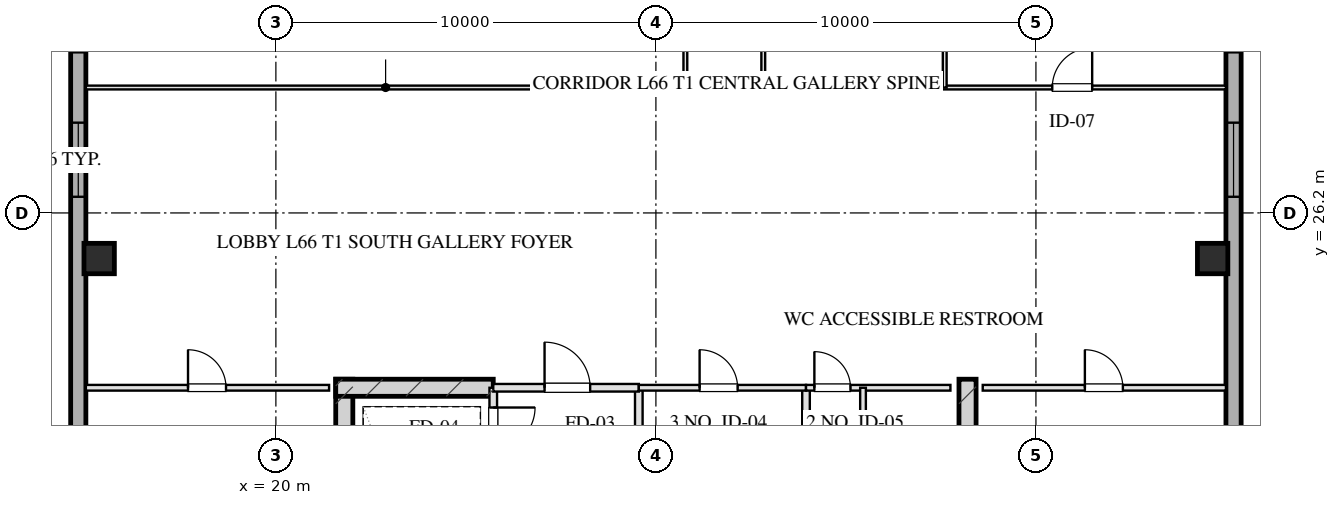
"""IFC4 building model, lengths in metres.
Left out: names, types, materials, properties, quantities, classifications, styles, units other than length and angle.
Written with IfcOpenShell. Run it as: python <this file> out.ifc"""

import sys

from ifc_helpers import new_model, si_unit, direction, frame, frame_2d, origin, origin_2d, place, context, subcontext, project, spatial, rectangle, hollow_rectangle, extrude, element, fill, save


model = new_model("IFC4")
c1 = context("Model", 3, precision=1e-05, world=origin(), true_north=direction((0.0, 1.0)))
c2 = subcontext(c1, "Body", "Model", "MODEL_VIEW")
j1 = project(units=[si_unit("LENGTHUNIT", "METRE"), si_unit("PLANEANGLEUNIT", "RADIAN")], contexts=[c1])
p1 = place(None, origin())
s1 = spatial("IfcSite", under=j1, at=p1, CompositionType="ELEMENT")
p2 = place(p1, origin())
s2 = spatial("IfcBuilding", under=s1, at=p2, CompositionType="ELEMENT")
p3 = place(p2, frame((0.0, 0.0, 244.0)))
s3 = spatial("IfcBuildingStorey", under=s2, at=p3, CompositionType="ELEMENT", Elevation=244.0)
for number, where, z_axis, x_axis in (
    (1, (21.8, 21.825, 0.0), (0.0, 0.0, 1.0), (0.0, -1.0, 0.0)),
    (2, (38.2, 21.825, 0.0), (0.0, 0.0, 1.0), (0.0, -1.0, 0.0)),
):
    element("IfcWall", number, at=place(p3, frame(where, z_axis=z_axis, x_axis=x_axis)), inside=s3, PredefinedType="SHEAR", context=c2, shape_type="SweptSolid", body=[
        extrude(rectangle(XDim=9.33, YDim=0.45, at=frame_2d((4.665, 0.0))), origin(), (0.0, 0.0, 1.0), 3.2),
    ])
p4 = place(p3, frame((21.575, 21.6, 0.0), z_axis=(0.0, 0.0, 1.0), x_axis=(1.0, 0.0, 0.0)))
e3 = element("IfcWall", 3, at=p4, inside=s3, PredefinedType="SHEAR", context=c2, shape_type="SweptSolid", body=[
    extrude(rectangle(XDim=4.145, YDim=0.45, at=frame_2d((2.073, 0.0))), origin(), (0.0, 0.0, 1.0), 3.2),
])
for number, where, z_axis, x_axis in (
    (4, (15.35, 25.0, 0.0), (0.0, 0.0, 1.0), (1.0, 0.0, 0.0)),
    (5, (44.65, 25.0, 0.0), (0.0, 0.0, 1.0), (1.0, 0.0, 0.0)),
):
    element("IfcColumn", number, at=place(p3, frame(where, z_axis=z_axis, x_axis=x_axis)), inside=s3, PredefinedType="COLUMN", context=c2, shape_type="SweptSolid", body=[
        extrude(hollow_rectangle(XDim=0.8, YDim=0.8, WallThickness=0.028, at=origin_2d()), origin(), (0.0, 0.0, 1.0), 3.201),
    ])
p5 = place(p3, frame((14.8, 13.1, 0.0), z_axis=(0.0, 0.0, 1.0), x_axis=(0.0, 1.0, 0.0)))
e6 = element("IfcWall", 6, at=p5, inside=s3, PredefinedType="SOLIDWALL", context=c2, shape_type="SweptSolid", body=[
    extrude(rectangle(XDim=41.8, YDim=0.4, at=frame_2d((20.9, 0.0))), origin(), (0.0, 0.0, 1.0), 2.36),
])
p6 = place(p5, frame((13.525, 0.0, 0.75)))
e7 = element("IfcOpeningElement", 7, at=p6, cuts=e6, PredefinedType="OPENING", context=c2, shape_type="SweptSolid", body=[
    extrude(rectangle(XDim=1.95, YDim=1.21, at=frame_2d((0.975, 0.605))), frame((0.0, 0.21, 0.0), z_axis=(0.0, -1.0, 0.0), x_axis=(1.0, 0.0, 0.0)), (0.0, 0.0, 1.0), 0.42),
])
p7 = place(p5, frame((17.325, 0.0, 0.75)))
e8 = element("IfcOpeningElement", 8, at=p7, cuts=e6, PredefinedType="OPENING", context=c2, shape_type="SweptSolid", body=[
    extrude(rectangle(XDim=1.95, YDim=1.21, at=frame_2d((0.975, 0.605))), frame((0.0, 0.21, 0.0), z_axis=(0.0, -1.0, 0.0), x_axis=(1.0, 0.0, 0.0)), (0.0, 0.0, 1.0), 0.42),
])
p8 = place(p5, frame((22.525, 0.0, 0.75)))
e9 = element("IfcOpeningElement", 9, at=p8, cuts=e6, PredefinedType="OPENING", context=c2, shape_type="SweptSolid", body=[
    extrude(rectangle(XDim=1.95, YDim=1.21, at=frame_2d((0.975, 0.605))), frame((0.0, 0.21, 0.0), z_axis=(0.0, -1.0, 0.0), x_axis=(1.0, 0.0, 0.0)), (0.0, 0.0, 1.0), 0.42),
])
p9 = place(p5, frame((26.325, 0.0, 0.75)))
e10 = element("IfcOpeningElement", 10, at=p9, cuts=e6, PredefinedType="OPENING", context=c2, shape_type="SweptSolid", body=[
    extrude(rectangle(XDim=1.95, YDim=1.21, at=frame_2d((0.975, 0.605))), frame((0.0, 0.21, 0.0), z_axis=(0.0, -1.0, 0.0), x_axis=(1.0, 0.0, 0.0)), (0.0, 0.0, 1.0), 0.42),
])
p10 = place(p3, frame((45.2, 54.9, 0.0), z_axis=(0.0, 0.0, 1.0), x_axis=(0.0, -1.0, 0.0)))
e11 = element("IfcWall", 11, at=p10, inside=s3, PredefinedType="SOLIDWALL", context=c2, shape_type="SweptSolid", body=[
    extrude(rectangle(XDim=41.8, YDim=0.4, at=frame_2d((20.9, 0.0))), origin(), (0.0, 0.0, 1.0), 2.36),
])
p11 = place(p10, frame((26.325, 0.0, 0.75)))
e12 = element("IfcOpeningElement", 12, at=p11, cuts=e11, PredefinedType="OPENING", context=c2, shape_type="SweptSolid", body=[
    extrude(rectangle(XDim=1.95, YDim=1.21, at=frame_2d((0.975, 0.605))), frame((0.0, 0.21, 0.0), z_axis=(0.0, -1.0, 0.0), x_axis=(1.0, 0.0, 0.0)), (0.0, 0.0, 1.0), 0.42),
])
p12 = place(p10, frame((22.525, 0.0, 0.75)))
e13 = element("IfcOpeningElement", 13, at=p12, cuts=e11, PredefinedType="OPENING", context=c2, shape_type="SweptSolid", body=[
    extrude(rectangle(XDim=1.95, YDim=1.21, at=frame_2d((0.975, 0.605))), frame((0.0, 0.21, 0.0), z_axis=(0.0, -1.0, 0.0), x_axis=(1.0, 0.0, 0.0)), (0.0, 0.0, 1.0), 0.42),
])
p13 = place(p10, frame((17.325, 0.0, 0.75)))
e14 = element("IfcOpeningElement", 14, at=p13, cuts=e11, PredefinedType="OPENING", context=c2, shape_type="SweptSolid", body=[
    extrude(rectangle(XDim=1.95, YDim=1.21, at=frame_2d((0.975, 0.605))), frame((0.0, 0.21, 0.0), z_axis=(0.0, -1.0, 0.0), x_axis=(1.0, 0.0, 0.0)), (0.0, 0.0, 1.0), 0.42),
])
p14 = place(p10, frame((13.525, 0.0, 0.75)))
e15 = element("IfcOpeningElement", 15, at=p14, cuts=e11, PredefinedType="OPENING", context=c2, shape_type="SweptSolid", body=[
    extrude(rectangle(XDim=1.95, YDim=1.21, at=frame_2d((0.975, 0.605))), frame((0.0, 0.21, 0.0), z_axis=(0.0, -1.0, 0.0), x_axis=(1.0, 0.0, 0.0)), (0.0, 0.0, 1.0), 0.42),
])
p15 = place(p3, frame((25.72, 21.6, 0.0), z_axis=(0.0, 0.0, 1.0), x_axis=(0.0, -1.0, 0.0)))
e16 = element("IfcWall", 16, at=p15, inside=s3, PredefinedType="PARTITIONING", context=c2, shape_type="SweptSolid", body=[
    extrude(rectangle(XDim=1.9, YDim=0.2, at=frame_2d((0.95, 0.0))), origin(), (0.0, 0.0, 1.0), 2.925),
])
p16 = place(p15, frame((0.52, 0.0, 0.0)))
e17 = element("IfcOpeningElement", 17, at=p16, cuts=e16, PredefinedType="OPENING", context=c2, shape_type="SweptSolid", body=[
    extrude(rectangle(XDim=1.1, YDim=2.05, at=frame_2d((0.55, 1.025))), frame((0.0, 0.11, 0.0), z_axis=(0.0, -1.0, 0.0), x_axis=(1.0, 0.0, 0.0)), (0.0, 0.0, 1.0), 0.22),
])
p17 = place(p3, frame((29.55, 21.6, 0.0), z_axis=(0.0, 0.0, 1.0), x_axis=(0.0, -1.0, 0.0)))
e18 = element("IfcWall", 18, at=p17, inside=s3, PredefinedType="PARTITIONING", context=c2, shape_type="SweptSolid", body=[
    extrude(rectangle(XDim=8.43, YDim=0.2, at=frame_2d((4.215, 0.0))), origin(), (0.0, 0.0, 1.0), 2.925),
])
p18 = place(p3, frame((25.72, 21.6, 0.0), z_axis=(0.0, 0.0, 1.0), x_axis=(1.0, 0.0, 0.0)))
e19 = element("IfcWall", 19, at=p18, inside=s3, PredefinedType="PARTITIONING", context=c2, shape_type="SweptSolid", body=[
    extrude(rectangle(XDim=3.83, YDim=0.2, at=frame_2d((1.915, 0.0))), origin(), (0.0, 0.0, 1.0), 2.925),
])
p19 = place(p18, frame((1.35, 0.0, 0.0)))
e20 = element("IfcOpeningElement", 20, at=p19, cuts=e19, PredefinedType="OPENING", context=c2, shape_type="SweptSolid", body=[
    extrude(rectangle(XDim=1.2, YDim=2.05, at=frame_2d((0.6, 1.025))), frame((0.0, 0.11, 0.0), z_axis=(0.0, -1.0, 0.0), x_axis=(1.0, 0.0, 0.0)), (0.0, 0.0, 1.0), 0.22),
])
p20 = place(p3, frame((33.95, 21.6, 0.0), z_axis=(0.0, 0.0, 1.0), x_axis=(0.0, -1.0, 0.0)))
e21 = element("IfcWall", 21, at=p20, inside=s3, PredefinedType="PARTITIONING", context=c2, shape_type="SweptSolid", body=[
    extrude(rectangle(XDim=8.43, YDim=0.2, at=frame_2d((4.215, 0.0))), origin(), (0.0, 0.0, 1.0), 2.925),
])
p21 = place(p3, frame((29.55, 21.6, 0.0), z_axis=(0.0, 0.0, 1.0), x_axis=(1.0, 0.0, 0.0)))
e22 = element("IfcWall", 22, at=p21, inside=s3, PredefinedType="PARTITIONING", context=c2, shape_type="SweptSolid", body=[
    extrude(rectangle(XDim=4.4, YDim=0.15, at=frame_2d((2.2, 0.0))), origin(), (0.0, 0.0, 1.0), 2.925),
])
p22 = place(p21, frame((1.6, 0.0, 0.0)))
e23 = element("IfcOpeningElement", 23, at=p22, cuts=e22, PredefinedType="OPENING", context=c2, shape_type="SweptSolid", body=[
    extrude(rectangle(XDim=1.0, YDim=2.05, at=frame_2d((0.5, 1.025))), frame((0.0, 0.085, 0.0), z_axis=(0.0, -1.0, 0.0), x_axis=(1.0, 0.0, 0.0)), (0.0, 0.0, 1.0), 0.17),
])
p23 = place(p3, frame((33.95, 21.6, 0.0), z_axis=(0.0, 0.0, 1.0), x_axis=(1.0, 0.0, 0.0)))
e24 = element("IfcWall", 24, at=p23, inside=s3, PredefinedType="PARTITIONING", context=c2, shape_type="SweptSolid", body=[
    extrude(rectangle(XDim=3.8, YDim=0.15, at=frame_2d((1.9, 0.0))), origin(), (0.0, 0.0, 1.0), 2.925),
])
p24 = place(p23, frame((0.22, 0.0, 0.0)))
e25 = element("IfcOpeningElement", 25, at=p24, cuts=e24, PredefinedType="OPENING", context=c2, shape_type="SweptSolid", body=[
    extrude(rectangle(XDim=0.95, YDim=2.05, at=frame_2d((0.475, 1.025))), frame((0.0, 0.085, 0.0), z_axis=(0.0, -1.0, 0.0), x_axis=(1.0, 0.0, 0.0)), (0.0, 0.0, 1.0), 0.17),
])
p25 = place(p3, frame((35.45, 21.6, 0.0), z_axis=(0.0, 0.0, 1.0), x_axis=(0.0, -1.0, 0.0)))
e26 = element("IfcWall", 26, at=p25, inside=s3, PredefinedType="PARTITIONING", context=c2, shape_type="SweptSolid", body=[
    extrude(rectangle(XDim=8.43, YDim=0.15, at=frame_2d((4.215, 0.0))), origin(), (0.0, 0.0, 1.0), 2.515),
])
p26 = place(p25, frame((2.55, 0.0, 0.0)))
e27 = element("IfcOpeningElement", 27, at=p26, cuts=e26, PredefinedType="OPENING", context=c2, shape_type="SweptSolid", body=[
    extrude(rectangle(XDim=0.95, YDim=2.05, at=frame_2d((0.475, 1.025))), frame((0.0, 0.085, 0.0), z_axis=(0.0, -1.0, 0.0), x_axis=(1.0, 0.0, 0.0)), (0.0, 0.0, 1.0), 0.17),
])
p27 = place(p25, frame((5.8, 0.0, 0.0)))
e28 = element("IfcOpeningElement", 28, at=p27, cuts=e26, PredefinedType="OPENING", context=c2, shape_type="SweptSolid", body=[
    extrude(rectangle(XDim=0.9, YDim=2.05, at=frame_2d((0.45, 1.025))), frame((0.0, 0.085, 0.0), z_axis=(0.0, -1.0, 0.0), x_axis=(1.0, 0.0, 0.0)), (0.0, 0.0, 1.0), 0.17),
])
p28 = place(p3, frame((15.0, 21.6, 0.0), z_axis=(0.0, 0.0, 1.0), x_axis=(1.0, 0.0, 0.0)))
e29 = element("IfcWall", 29, at=p28, inside=s3, PredefinedType="PARTITIONING", context=c2, shape_type="SweptSolid", body=[
    extrude(rectangle(XDim=6.4, YDim=0.15, at=frame_2d((3.2, 0.0))), origin(), (0.0, 0.0, 1.0), 2.925),
])
p29 = place(p28, frame((2.688, 0.0, 0.0)))
e30 = element("IfcOpeningElement", 30, at=p29, cuts=e29, PredefinedType="OPENING", context=c2, shape_type="SweptSolid", body=[
    extrude(rectangle(XDim=1.0, YDim=2.05, at=frame_2d((0.5, 1.025))), frame((0.0, 0.085, 0.0), z_axis=(0.0, -1.0, 0.0), x_axis=(1.0, 0.0, 0.0)), (0.0, 0.0, 1.0), 0.17),
])
p30 = place(p3, frame((38.6, 21.6, 0.0), z_axis=(0.0, 0.0, 1.0), x_axis=(1.0, 0.0, 0.0)))
e31 = element("IfcWall", 31, at=p30, inside=s3, PredefinedType="PARTITIONING", context=c2, shape_type="SweptSolid", body=[
    extrude(rectangle(XDim=6.4, YDim=0.15, at=frame_2d((3.2, 0.0))), origin(), (0.0, 0.0, 1.0), 2.925),
])
p31 = place(p30, frame((2.688, 0.0, 0.0)))
e32 = element("IfcOpeningElement", 32, at=p31, cuts=e31, PredefinedType="OPENING", context=c2, shape_type="SweptSolid", body=[
    extrude(rectangle(XDim=1.0, YDim=2.05, at=frame_2d((0.5, 1.025))), frame((0.0, 0.085, 0.0), z_axis=(0.0, -1.0, 0.0), x_axis=(1.0, 0.0, 0.0)), (0.0, 0.0, 1.0), 0.17),
])
p32 = place(p3, frame((15.0, 29.5, 0.0), z_axis=(0.0, 0.0, 1.0), x_axis=(1.0, 0.0, 0.0)))
e33 = element("IfcWall", 33, at=p32, inside=s3, PredefinedType="MOVABLE", context=c2, shape_type="SweptSolid", body=[
    extrude(rectangle(XDim=15.775, YDim=0.1, at=frame_2d((7.887, 0.0))), origin(), (0.0, 0.0, 1.0), 2.925),
])
p33 = place(p3, frame((32.825, 29.5, 0.0), z_axis=(0.0, 0.0, 1.0), x_axis=(1.0, 0.0, 0.0)))
e34 = element("IfcWall", 34, at=p33, inside=s3, PredefinedType="MOVABLE", context=c2, shape_type="SweptSolid", body=[
    extrude(rectangle(XDim=12.175, YDim=0.1, at=frame_2d((6.087, 0.0))), origin(), (0.0, 0.0, 1.0), 2.925),
])
p34 = place(p33, frame((7.605, 0.0, 0.0)))
e35 = element("IfcOpeningElement", 35, at=p34, cuts=e34, PredefinedType="OPENING", context=c2, shape_type="SweptSolid", body=[
    extrude(rectangle(XDim=1.05, YDim=2.05, at=frame_2d((0.525, 1.025))), frame((0.0, 0.06, 0.0), z_axis=(0.0, -1.0, 0.0), x_axis=(1.0, 0.0, 0.0)), (0.0, 0.0, 1.0), 0.12),
])
p35 = place(p3, frame((30.775, 29.5, 0.0), z_axis=(0.0, 0.0, 1.0), x_axis=(0.0, 1.0, 0.0)))
e36 = element("IfcWall", 36, at=p35, inside=s3, PredefinedType="MOVABLE", context=c2, shape_type="SweptSolid", body=[
    extrude(rectangle(XDim=9.0, YDim=0.1, at=frame_2d((4.5, 0.0))), origin(), (0.0, 0.0, 1.0), 2.925),
])
p36 = place(p35, frame((1.2, 0.0, 0.0)))
e37 = element("IfcOpeningElement", 37, at=p36, cuts=e36, PredefinedType="OPENING", context=c2, shape_type="SweptSolid", body=[
    extrude(rectangle(XDim=1.0, YDim=2.05, at=frame_2d((0.5, 1.025))), frame((0.0, 0.06, 0.0), z_axis=(0.0, -1.0, 0.0), x_axis=(1.0, 0.0, 0.0)), (0.0, 0.0, 1.0), 0.12),
])
p37 = place(p35, frame((4.035, 0.0, 0.0)))
e38 = element("IfcOpeningElement", 38, at=p37, cuts=e36, PredefinedType="OPENING", context=c2, shape_type="SweptSolid", body=[
    extrude(rectangle(XDim=1.0, YDim=2.05, at=frame_2d((0.5, 1.025))), frame((0.0, 0.06, 0.0), z_axis=(0.0, -1.0, 0.0), x_axis=(1.0, 0.0, 0.0)), (0.0, 0.0, 1.0), 0.12),
])
p38 = place(p35, frame((6.835, 0.0, 0.0)))
e39 = element("IfcOpeningElement", 39, at=p38, cuts=e36, PredefinedType="OPENING", context=c2, shape_type="SweptSolid", body=[
    extrude(rectangle(XDim=1.0, YDim=2.05, at=frame_2d((0.5, 1.025))), frame((0.0, 0.06, 0.0), z_axis=(0.0, -1.0, 0.0), x_axis=(1.0, 0.0, 0.0)), (0.0, 0.0, 1.0), 0.12),
])
p39 = place(p3, frame((32.825, 29.5, 0.0), z_axis=(0.0, 0.0, 1.0), x_axis=(0.0, 1.0, 0.0)))
e40 = element("IfcWall", 40, at=p39, inside=s3, PredefinedType="MOVABLE", context=c2, shape_type="SweptSolid", body=[
    extrude(rectangle(XDim=9.0, YDim=0.1, at=frame_2d((4.5, 0.0))), origin(), (0.0, 0.0, 1.0), 2.925),
])
p40 = place(p39, frame((4.0, 0.0, 0.0)))
e41 = element("IfcOpeningElement", 41, at=p40, cuts=e40, PredefinedType="OPENING", context=c2, shape_type="SweptSolid", body=[
    extrude(rectangle(XDim=1.0, YDim=2.05, at=frame_2d((0.5, 1.025))), frame((0.0, 0.06, 0.0), z_axis=(0.0, -1.0, 0.0), x_axis=(1.0, 0.0, 0.0)), (0.0, 0.0, 1.0), 0.12),
])
p41 = place(p3, frame((37.6, 29.5, 0.0), z_axis=(0.0, 0.0, 1.0), x_axis=(0.0, 1.0, 0.0)))
e42 = element("IfcWall", 42, at=p41, inside=s3, PredefinedType="MOVABLE", context=c2, shape_type="SweptSolid", body=[
    extrude(rectangle(XDim=9.0, YDim=0.1, at=frame_2d((4.5, 0.0))), origin(), (0.0, 0.0, 1.0), 2.925),
])
p42 = place(p6, origin())
e43 = element("IfcWindow", 43, at=p42, inside=s3, PartitioningType="TRIPLE_PANEL_VERTICAL", PredefinedType="WINDOW", context=c2, shape_type="SweptSolid", body=[
    extrude(rectangle(XDim=1.95, YDim=1.21, at=frame_2d((0.975, 0.605))), frame((0.0, 0.03, 0.0), z_axis=(0.0, -1.0, 0.0), x_axis=(1.0, 0.0, 0.0)), (0.0, 0.0, 1.0), 0.06),
])
fill(e7, e43)
p43 = place(p11, origin())
e44 = element("IfcWindow", 44, at=p43, inside=s3, PartitioningType="TRIPLE_PANEL_VERTICAL", PredefinedType="WINDOW", context=c2, shape_type="SweptSolid", body=[
    extrude(rectangle(XDim=1.95, YDim=1.21, at=frame_2d((0.975, 0.605))), frame((0.0, 0.03, 0.0), z_axis=(0.0, -1.0, 0.0), x_axis=(1.0, 0.0, 0.0)), (0.0, 0.0, 1.0), 0.06),
])
fill(e12, e44)
p44 = place(p16, origin())
e45 = element("IfcDoor", 45, at=p44, inside=s3, OperationType="SINGLE_SWING_LEFT", PredefinedType="DOOR", context=c2, shape_type="SweptSolid", body=[
    extrude(rectangle(XDim=1.1, YDim=2.05, at=frame_2d((0.55, 1.025))), frame((0.0, 0.025, 0.0), z_axis=(0.0, -1.0, 0.0), x_axis=(1.0, 0.0, 0.0)), (0.0, 0.0, 1.0), 0.05),
])
fill(e17, e45)
p45 = place(p19, origin())
e46 = element("IfcDoor", 46, at=p45, inside=s3, OperationType="SINGLE_SWING_LEFT", PredefinedType="DOOR", context=c2, shape_type="SweptSolid", body=[
    extrude(rectangle(XDim=1.2, YDim=2.05, at=frame_2d((0.6, 1.025))), frame((0.0, 0.025, 0.0), z_axis=(0.0, -1.0, 0.0), x_axis=(1.0, 0.0, 0.0)), (0.0, 0.0, 1.0), 0.05),
])
fill(e20, e46)
p46 = place(p22, origin())
e47 = element("IfcDoor", 47, at=p46, inside=s3, OperationType="SINGLE_SWING_LEFT", PredefinedType="DOOR", context=c2, shape_type="SweptSolid", body=[
    extrude(rectangle(XDim=1.0, YDim=2.05, at=frame_2d((0.5, 1.025))), frame((0.0, 0.025, 0.0), z_axis=(0.0, -1.0, 0.0), x_axis=(1.0, 0.0, 0.0)), (0.0, 0.0, 1.0), 0.05),
])
fill(e23, e47)
p47 = place(p24, origin())
e48 = element("IfcDoor", 48, at=p47, inside=s3, OperationType="SINGLE_SWING_LEFT", PredefinedType="DOOR", context=c2, shape_type="SweptSolid", body=[
    extrude(rectangle(XDim=0.95, YDim=2.05, at=frame_2d((0.475, 1.025))), frame((0.0, 0.025, 0.0), z_axis=(0.0, -1.0, 0.0), x_axis=(1.0, 0.0, 0.0)), (0.0, 0.0, 1.0), 0.05),
])
fill(e25, e48)
p48 = place(p29, origin())
e49 = element("IfcDoor", 49, at=p48, inside=s3, OperationType="SINGLE_SWING_LEFT", PredefinedType="DOOR", context=c2, shape_type="SweptSolid", body=[
    extrude(rectangle(XDim=1.0, YDim=2.05, at=frame_2d((0.5, 1.025))), frame((0.0, 0.025, 0.0), z_axis=(0.0, -1.0, 0.0), x_axis=(1.0, 0.0, 0.0)), (0.0, 0.0, 1.0), 0.05),
])
fill(e30, e49)
p49 = place(p31, origin())
e50 = element("IfcDoor", 50, at=p49, inside=s3, OperationType="SINGLE_SWING_LEFT", PredefinedType="DOOR", context=c2, shape_type="SweptSolid", body=[
    extrude(rectangle(XDim=1.0, YDim=2.05, at=frame_2d((0.5, 1.025))), frame((0.0, 0.025, 0.0), z_axis=(0.0, -1.0, 0.0), x_axis=(1.0, 0.0, 0.0)), (0.0, 0.0, 1.0), 0.05),
])
fill(e32, e50)
p50 = place(p34, origin())
e51 = element("IfcDoor", 51, at=p50, inside=s3, OperationType="SINGLE_SWING_RIGHT", PredefinedType="DOOR", context=c2, shape_type="SweptSolid", body=[
    extrude(rectangle(XDim=1.05, YDim=2.05, at=frame_2d((0.525, 1.025))), frame((0.0, 0.025, 0.0), z_axis=(0.0, -1.0, 0.0), x_axis=(1.0, 0.0, 0.0)), (0.0, 0.0, 1.0), 0.05),
])
fill(e35, e51)
save(model, sys.argv[1])
